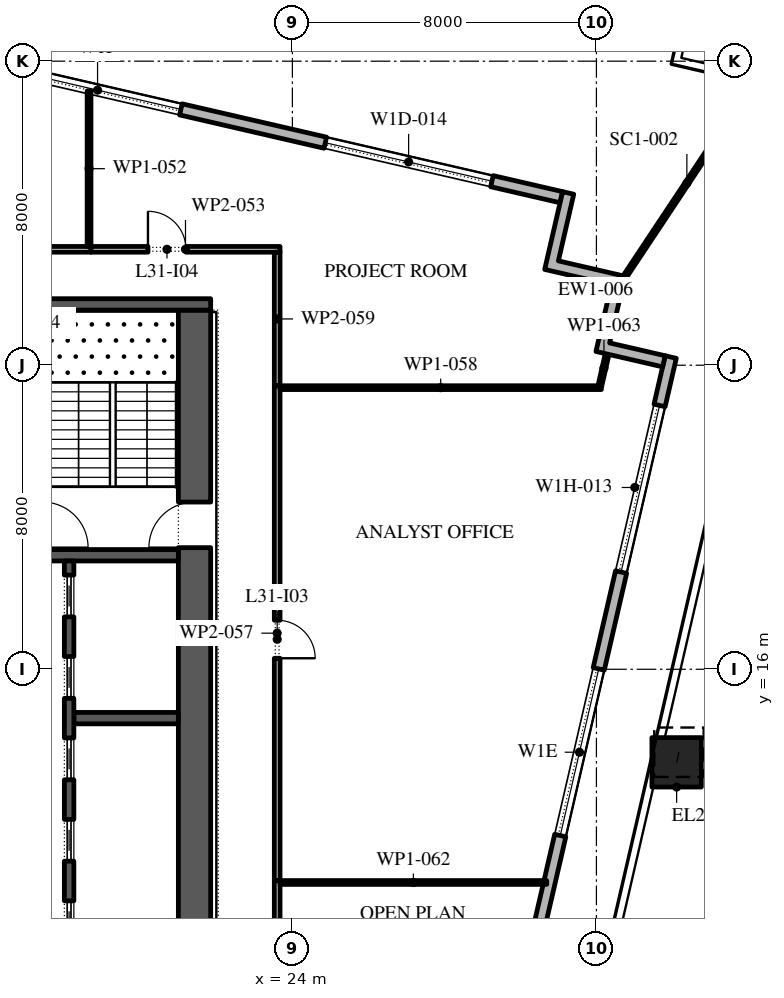
"""IFC4 building model, lengths in metres.
Left out: names, types, materials, properties, quantities, classifications, styles, units other than length and angle.
Written with IfcOpenShell. Run it as: python <this file> out.ifc"""

import sys

from ifc_helpers import new_model, si_unit, direction, frame, frame_2d, origin, origin_2d, place, context, subcontext, project, spatial, polyline, rectangle, outline, extrude, element, fill, save


model = new_model("IFC4")
c1 = context("Model", 3, precision=1e-05, world=origin(), true_north=direction((0.0, 1.0)))
c2 = subcontext(c1, "Body", "Model", "MODEL_VIEW")
j1 = project(units=[si_unit("LENGTHUNIT", "METRE"), si_unit("PLANEANGLEUNIT", "RADIAN")], contexts=[c1])
p1 = place(None, origin())
s1 = spatial("IfcSite", under=j1, at=p1, CompositionType="ELEMENT")
p2 = place(p1, origin())
s2 = spatial("IfcBuilding", under=s1, at=p2, CompositionType="ELEMENT")
p3 = place(p2, frame((0.0, 0.0, 143.4)))
s3 = spatial("IfcBuildingStorey", under=s2, at=p3, CompositionType="ELEMENT", Elevation=143.4)
p4 = place(p3, frame((34.111, 13.552, 0.0), z_axis=(0.014558999143, 0.063108330945, 0.997900483069), x_axis=(-0.97440628778, 0.224794097641, 0.0)))
e1 = element("IfcColumn", 1, at=p4, inside=s3, PredefinedType="COLUMN", context=c2, shape_type="SweptSolid", body=[
    extrude(rectangle(XDim=1.3, YDim=1.3, at=origin_2d()), origin(), (0.0, 0.0, 1.0), 4.209),
])
p5 = place(p3, frame((22.82, -24.016, 0.0), z_axis=(0.0, 0.0, 1.0), x_axis=(0.224953880882, 0.974369412223, 0.0)))
e2 = element("IfcWall", 2, at=p5, inside=s3, PredefinedType="STANDARD", context=c2, shape_type="SweptSolid", body=[
    extrude(rectangle(XDim=49.5, YDim=0.3, at=frame_2d((24.75, 0.0))), origin(), (0.0, 0.0, 1.0), 4.0),
])
p6 = place(p5, frame((1.157, 0.0, 0.45)))
e3 = element("IfcOpeningElement", 3, at=p6, cuts=e2, PredefinedType="OPENING", context=c2, shape_type="SweptSolid", body=[
    extrude(rectangle(XDim=4.5, YDim=3.05, at=frame_2d((2.25, 1.525))), frame((0.0, 0.16, 0.0), z_axis=(0.0, -1.0, 0.0), x_axis=(1.0, 0.0, 0.0)), (0.0, 0.0, 1.0), 0.32),
])
p7 = place(p5, frame((8.121, 0.0, 0.45)))
e4 = element("IfcOpeningElement", 4, at=p7, cuts=e2, PredefinedType="OPENING", context=c2, shape_type="SweptSolid", body=[
    extrude(rectangle(XDim=4.5, YDim=3.05, at=frame_2d((2.25, 1.525))), frame((0.0, 0.16, 0.0), z_axis=(0.0, -1.0, 0.0), x_axis=(1.0, 0.0, 0.0)), (0.0, 0.0, 1.0), 0.32),
])
p8 = place(p5, frame((15.236, 0.0, 0.45)))
e5 = element("IfcOpeningElement", 5, at=p8, cuts=e2, PredefinedType="OPENING", context=c2, shape_type="SweptSolid", body=[
    extrude(rectangle(XDim=4.5, YDim=3.05, at=frame_2d((2.25, 1.525))), frame((0.0, 0.16, 0.0), z_axis=(0.0, -1.0, 0.0), x_axis=(1.0, 0.0, 0.0)), (0.0, 0.0, 1.0), 0.32),
])
p9 = place(p5, frame((23.4, 0.0, 0.0)))
e6 = element("IfcOpeningElement", 6, at=p9, cuts=e2, PredefinedType="OPENING", context=c2, shape_type="SweptSolid", body=[
    extrude(rectangle(XDim=2.4, YDim=3.5, at=frame_2d((1.2, 1.75))), frame((0.0, 0.16, 0.0), z_axis=(0.0, -1.0, 0.0), x_axis=(1.0, 0.0, 0.0)), (0.0, 0.0, 1.0), 0.32),
])
p10 = place(p5, frame((29.464, 0.0, 0.45)))
e7 = element("IfcOpeningElement", 7, at=p10, cuts=e2, PredefinedType="OPENING", context=c2, shape_type="SweptSolid", body=[
    extrude(rectangle(XDim=4.5, YDim=2.875, at=frame_2d((2.25, 1.438))), frame((0.0, 0.16, 0.0), z_axis=(0.0, -1.0, 0.0), x_axis=(1.0, 0.0, 0.0)), (0.0, 0.0, 1.0), 0.32),
])
p11 = place(p5, frame((36.579, 0.0, 0.45)))
e8 = element("IfcOpeningElement", 8, at=p11, cuts=e2, PredefinedType="OPENING", context=c2, shape_type="SweptSolid", body=[
    extrude(rectangle(XDim=4.5, YDim=2.825, at=frame_2d((2.25, 1.413))), frame((0.0, 0.16, 0.0), z_axis=(0.0, -1.0, 0.0), x_axis=(1.0, 0.0, 0.0)), (0.0, 0.0, 1.0), 0.32),
])
p12 = place(p5, frame((43.693, 0.0, 0.45)))
e9 = element("IfcOpeningElement", 9, at=p12, cuts=e2, PredefinedType="OPENING", context=c2, shape_type="SweptSolid", body=[
    extrude(rectangle(XDim=4.5, YDim=2.75, at=frame_2d((2.25, 1.375))), frame((0.0, 0.16, 0.0), z_axis=(0.0, -1.0, 0.0), x_axis=(1.0, 0.0, 0.0)), (0.0, 0.0, 1.0), 0.32),
])
p13 = place(p3, frame((31.078, 28.421, 0.0), z_axis=(0.0, 0.0, 1.0), x_axis=(-0.974370456532, 0.224949357493, 0.0)))
e10 = element("IfcWall", 10, at=p13, inside=s3, PredefinedType="STANDARD", context=c2, shape_type="SweptSolid", body=[
    extrude(rectangle(XDim=51.0, YDim=0.3, at=frame_2d((25.5, 0.0))), origin(), (0.0, 0.0, 1.0), 4.0),
])
p14 = place(p13, frame((1.875, 0.0, 0.45)))
e11 = element("IfcOpeningElement", 11, at=p14, cuts=e10, PredefinedType="OPENING", context=c2, shape_type="SweptSolid", body=[
    extrude(rectangle(XDim=4.5, YDim=2.875, at=frame_2d((2.25, 1.438))), frame((0.0, 0.16, 0.0), z_axis=(0.0, -1.0, 0.0), x_axis=(1.0, 0.0, 0.0)), (0.0, 0.0, 1.0), 0.32),
])
p15 = place(p13, frame((10.275, 0.0, 0.45)))
e12 = element("IfcOpeningElement", 12, at=p15, cuts=e10, PredefinedType="OPENING", context=c2, shape_type="SweptSolid", body=[
    extrude(rectangle(XDim=4.5, YDim=2.8, at=frame_2d((2.25, 1.4))), frame((0.0, 0.16, 0.0), z_axis=(0.0, -1.0, 0.0), x_axis=(1.0, 0.0, 0.0)), (0.0, 0.0, 1.0), 0.32),
])
p16 = place(p13, frame((18.825, 0.0, 0.45)))
e13 = element("IfcOpeningElement", 13, at=p16, cuts=e10, PredefinedType="OPENING", context=c2, shape_type="SweptSolid", body=[
    extrude(rectangle(XDim=4.5, YDim=2.75, at=frame_2d((2.25, 1.375))), frame((0.0, 0.16, 0.0), z_axis=(0.0, -1.0, 0.0), x_axis=(1.0, 0.0, 0.0)), (0.0, 0.0, 1.0), 0.32),
])
p17 = place(p13, frame((28.425, 0.0, 0.0)))
e14 = element("IfcOpeningElement", 14, at=p17, cuts=e10, PredefinedType="OPENING", context=c2, shape_type="SweptSolid", body=[
    extrude(rectangle(XDim=2.4, YDim=3.025, at=frame_2d((1.2, 1.512))), frame((0.0, 0.16, 0.0), z_axis=(0.0, -1.0, 0.0), x_axis=(1.0, 0.0, 0.0)), (0.0, 0.0, 1.0), 0.32),
])
p18 = place(p13, frame((35.925, 0.0, 0.45)))
e15 = element("IfcOpeningElement", 15, at=p18, cuts=e10, PredefinedType="OPENING", context=c2, shape_type="SweptSolid", body=[
    extrude(rectangle(XDim=4.5, YDim=2.525, at=frame_2d((2.25, 1.262))), frame((0.0, 0.16, 0.0), z_axis=(0.0, -1.0, 0.0), x_axis=(1.0, 0.0, 0.0)), (0.0, 0.0, 1.0), 0.32),
])
p19 = place(p13, frame((44.475, 0.0, 0.45)))
e16 = element("IfcOpeningElement", 16, at=p19, cuts=e10, PredefinedType="OPENING", context=c2, shape_type="SweptSolid", body=[
    extrude(rectangle(XDim=4.5, YDim=2.45, at=frame_2d((2.25, 1.225))), frame((0.0, 0.16, 0.0), z_axis=(0.0, -1.0, 0.0), x_axis=(1.0, 0.0, 0.0)), (0.0, 0.0, 1.0), 0.32),
])
p20 = place(p3, origin())
e17 = element("IfcWall", 17, at=p20, inside=s3, PredefinedType="STANDARD", context=c2, shape_type="SweptSolid", body=[
    extrude(outline(polyline([(32.393, 26.116), (30.639, 26.521), (31.111, 28.567), (31.404, 28.5), (30.999, 26.746), (32.753, 26.341), (32.348, 24.587), (33.809, 24.25), (33.742, 23.957), (31.988, 24.362), (32.393, 26.116)])), origin(), (0.0, 0.0, 1.0), 4.0),
])
p21 = place(p3, frame((32.753, 26.341, -0.05), z_axis=(0.0, 0.0, 1.0), x_axis=(0.553540040051, 0.832822564572, 0.0)))
e18 = element("IfcWall", 18, at=p21, inside=s3, PredefinedType="STANDARD", context=c2, shape_type="SweptSolid", body=[
    extrude(rectangle(XDim=5.879, YDim=0.1, at=frame_2d((2.939, 0.0))), origin(), (0.0, 0.0, 1.0), 4.05),
])
p22 = place(p3, frame((21.425, -2.45, 0.0), z_axis=(0.0, 0.0, 1.0), x_axis=(0.0, 1.0, 0.0)))
e19 = element("IfcWall", 19, at=p22, inside=s3, PredefinedType="SHEAR", context=c2, shape_type="SweptSolid", body=[
    extrude(rectangle(XDim=27.9, YDim=0.85, at=frame_2d((13.95, 0.0))), origin(), (0.0, 0.0, 1.0), 4.0),
])
p23 = place(p22, frame((5.05, 0.0, 0.0)))
e20 = element("IfcOpeningElement", 20, at=p23, cuts=e19, PredefinedType="OPENING", context=c2, shape_type="SweptSolid", body=[
    extrude(rectangle(XDim=1.2, YDim=2.1, at=frame_2d((0.6, 1.05))), frame((0.0, 0.435, 0.0), z_axis=(0.0, -1.0, 0.0), x_axis=(1.0, 0.0, 0.0)), (0.0, 0.0, 1.0), 0.87),
])
p24 = place(p22, frame((21.65, 0.0, 0.0)))
e21 = element("IfcOpeningElement", 21, at=p24, cuts=e19, PredefinedType="OPENING", context=c2, shape_type="SweptSolid", body=[
    extrude(rectangle(XDim=1.2, YDim=2.1, at=frame_2d((0.6, 1.05))), frame((0.0, 0.435, 0.0), z_axis=(0.0, -1.0, 0.0), x_axis=(1.0, 0.0, 0.0)), (0.0, 0.0, 1.0), 0.87),
])
p25 = place(p3, frame((10.15, 25.6, 0.0), z_axis=(0.0, 0.0, 1.0), x_axis=(1.0, 0.0, 0.0)))
e22 = element("IfcWall", 22, at=p25, inside=s3, PredefinedType="SHEAR", context=c2, shape_type="SweptSolid", body=[
    extrude(rectangle(XDim=11.7, YDim=0.3, at=frame_2d((5.85, 0.0))), origin(), (0.0, 0.0, 1.0), 4.0),
])
p26 = place(p3, frame((17.3, 19.0, 0.0), z_axis=(0.0, 0.0, 1.0), x_axis=(1.0, 0.0, 0.0)))
e23 = element("IfcWall", 23, at=p26, inside=s3, PredefinedType="SHEAR", context=c2, shape_type="SweptSolid", body=[
    extrude(rectangle(XDim=3.7, YDim=0.3, at=frame_2d((1.85, 0.0))), origin(), (0.0, 0.0, 1.0), 4.0),
])
p27 = place(p3, frame((18.25, 14.714, 0.0), z_axis=(0.0, 0.0, 1.0), x_axis=(1.0, 0.0, 0.0)))
e24 = element("IfcWall", 24, at=p27, inside=s3, PredefinedType="SHEAR", context=c2, shape_type="SweptSolid", body=[
    extrude(rectangle(XDim=2.75, YDim=0.3, at=frame_2d((1.375, 0.0))), origin(), (0.0, 0.0, 1.0), 4.0),
])
p28 = place(p3, frame((18.125, 4.15, 0.0), z_axis=(0.0, 0.0, 1.0), x_axis=(0.0, 1.0, 0.0)))
e25 = element("IfcWall", 25, at=p28, inside=s3, PredefinedType="SHEAR", context=c2, shape_type="SweptSolid", body=[
    extrude(rectangle(XDim=14.7, YDim=0.25, at=frame_2d((7.35, 0.0))), origin(), (0.0, 0.0, 1.0), 4.0),
])
p29 = place(p28, frame((0.371, 0.0, 0.0)))
e26 = element("IfcOpeningElement", 26, at=p29, cuts=e25, PredefinedType="OPENING", context=c2, shape_type="SweptSolid", body=[
    extrude(rectangle(XDim=1.1, YDim=2.1, at=frame_2d((0.55, 1.05))), frame((0.0, 0.135, 0.0), z_axis=(0.0, -1.0, 0.0), x_axis=(1.0, 0.0, 0.0)), (0.0, 0.0, 1.0), 0.27),
])
p30 = place(p28, frame((2.514, 0.0, 0.0)))
e27 = element("IfcOpeningElement", 27, at=p30, cuts=e25, PredefinedType="OPENING", context=c2, shape_type="SweptSolid", body=[
    extrude(rectangle(XDim=1.1, YDim=2.1, at=frame_2d((0.55, 1.05))), frame((0.0, 0.135, 0.0), z_axis=(0.0, -1.0, 0.0), x_axis=(1.0, 0.0, 0.0)), (0.0, 0.0, 1.0), 0.27),
])
p31 = place(p28, frame((4.657, 0.0, 0.0)))
e28 = element("IfcOpeningElement", 28, at=p31, cuts=e25, PredefinedType="OPENING", context=c2, shape_type="SweptSolid", body=[
    extrude(rectangle(XDim=1.1, YDim=2.1, at=frame_2d((0.55, 1.05))), frame((0.0, 0.135, 0.0), z_axis=(0.0, -1.0, 0.0), x_axis=(1.0, 0.0, 0.0)), (0.0, 0.0, 1.0), 0.27),
])
p32 = place(p28, frame((6.8, 0.0, 0.0)))
e29 = element("IfcOpeningElement", 29, at=p32, cuts=e25, PredefinedType="OPENING", context=c2, shape_type="SweptSolid", body=[
    extrude(rectangle(XDim=1.1, YDim=2.1, at=frame_2d((0.55, 1.05))), frame((0.0, 0.135, 0.0), z_axis=(0.0, -1.0, 0.0), x_axis=(1.0, 0.0, 0.0)), (0.0, 0.0, 1.0), 0.27),
])
p33 = place(p28, frame((8.943, 0.0, 0.0)))
e30 = element("IfcOpeningElement", 30, at=p33, cuts=e25, PredefinedType="OPENING", context=c2, shape_type="SweptSolid", body=[
    extrude(rectangle(XDim=1.1, YDim=2.1, at=frame_2d((0.55, 1.05))), frame((0.0, 0.135, 0.0), z_axis=(0.0, -1.0, 0.0), x_axis=(1.0, 0.0, 0.0)), (0.0, 0.0, 1.0), 0.27),
])
p34 = place(p28, frame((11.086, 0.0, 0.0)))
e31 = element("IfcOpeningElement", 31, at=p34, cuts=e25, PredefinedType="OPENING", context=c2, shape_type="SweptSolid", body=[
    extrude(rectangle(XDim=1.1, YDim=2.1, at=frame_2d((0.55, 1.05))), frame((0.0, 0.135, 0.0), z_axis=(0.0, -1.0, 0.0), x_axis=(1.0, 0.0, 0.0)), (0.0, 0.0, 1.0), 0.27),
])
p35 = place(p28, frame((13.229, 0.0, 0.0)))
e32 = element("IfcOpeningElement", 32, at=p35, cuts=e25, PredefinedType="OPENING", context=c2, shape_type="SweptSolid", body=[
    extrude(rectangle(XDim=1.1, YDim=2.1, at=frame_2d((0.55, 1.05))), frame((0.0, 0.135, 0.0), z_axis=(0.0, -1.0, 0.0), x_axis=(1.0, 0.0, 0.0)), (0.0, 0.0, 1.0), 0.27),
])
p36 = place(p3, frame((8.4, 27.05, 0.0), z_axis=(0.0, 0.0, 1.0), x_axis=(1.0, 0.0, 0.0)))
e33 = element("IfcWall", 33, at=p36, inside=s3, PredefinedType="PARTITIONING", context=c2, shape_type="SweptSolid", body=[
    extrude(rectangle(XDim=10.3, YDim=0.15, at=frame_2d((5.15, 0.0))), origin(), (0.0, 0.0, 1.0), 4.0),
])
p37 = place(p36, frame((6.6, 0.0, 0.0)))
e34 = element("IfcOpeningElement", 34, at=p37, cuts=e33, PredefinedType="OPENING", context=c2, shape_type="SweptSolid", body=[
    extrude(rectangle(XDim=1.0, YDim=2.1, at=frame_2d((0.5, 1.05))), frame((0.0, 0.085, 0.0), z_axis=(0.0, -1.0, 0.0), x_axis=(1.0, 0.0, 0.0)), (0.0, 0.0, 1.0), 0.17),
])
p38 = place(p3, frame((18.65, 27.125, 0.0), z_axis=(0.0, 0.0, 1.0), x_axis=(0.0, 1.0, 0.0)))
e35 = element("IfcWall", 35, at=p38, inside=s3, PredefinedType="PARTITIONING", context=c2, shape_type="SweptSolid", body=[
    extrude(rectangle(XDim=4.094, YDim=0.1, at=frame_2d((2.047, 0.0))), origin(), (0.0, 0.0, 1.0), 4.0),
])
p39 = place(p3, frame((18.7, 27.05, 0.0), z_axis=(0.0, 0.0, 1.0), x_axis=(1.0, 0.0, 0.0)))
e36 = element("IfcWall", 36, at=p39, inside=s3, PredefinedType="PARTITIONING", context=c2, shape_type="SweptSolid", body=[
    extrude(rectangle(XDim=4.975, YDim=0.15, at=frame_2d((2.488, 0.0))), origin(), (0.0, 0.0, 1.0), 4.0),
])
p40 = place(p39, frame((1.5, 0.0, 0.0)))
e37 = element("IfcOpeningElement", 37, at=p40, cuts=e36, PredefinedType="OPENING", context=c2, shape_type="SweptSolid", body=[
    extrude(rectangle(XDim=1.0, YDim=2.1, at=frame_2d((0.5, 1.05))), frame((0.0, 0.085, 0.0), z_axis=(0.0, -1.0, 0.0), x_axis=(1.0, 0.0, 0.0)), (0.0, 0.0, 1.0), 0.17),
])
p41 = place(p3, frame((23.6, 10.44, 0.0), z_axis=(0.0, 0.0, 1.0), x_axis=(0.0, -1.0, 0.0)))
e38 = element("IfcWall", 38, at=p41, inside=s3, PredefinedType="PARTITIONING", context=c2, shape_type="SweptSolid", body=[
    extrude(rectangle(XDim=14.81, YDim=0.15, at=frame_2d((7.405, 0.0))), origin(), (0.0, 0.0, 1.0), 4.0),
])
p42 = place(p41, frame((6.86, 0.0, 0.0)))
e39 = element("IfcOpeningElement", 39, at=p42, cuts=e38, PredefinedType="OPENING", context=c2, shape_type="SweptSolid", body=[
    extrude(rectangle(XDim=1.0, YDim=2.1, at=frame_2d((0.5, 1.05))), frame((0.0, 0.085, 0.0), z_axis=(0.0, -1.0, 0.0), x_axis=(1.0, 0.0, 0.0)), (0.0, 0.0, 1.0), 0.17),
])
p43 = place(p3, frame((23.6, 23.46, 0.0), z_axis=(0.0, 0.0, 1.0), x_axis=(0.0, -1.0, 0.0)))
e40 = element("IfcWall", 40, at=p43, inside=s3, PredefinedType="PARTITIONING", context=c2, shape_type="SweptSolid", body=[
    extrude(rectangle(XDim=13.02, YDim=0.15, at=frame_2d((6.51, 0.0))), origin(), (0.0, 0.0, 1.0), 4.0),
])
p44 = place(p43, frame((6.17, 0.0, 0.0)))
e41 = element("IfcOpeningElement", 41, at=p44, cuts=e40, PredefinedType="OPENING", context=c2, shape_type="SweptSolid", body=[
    extrude(rectangle(XDim=1.0, YDim=2.1, at=frame_2d((0.5, 1.05))), frame((0.0, 0.085, 0.0), z_axis=(0.0, -1.0, 0.0), x_axis=(1.0, 0.0, 0.0)), (0.0, 0.0, 1.0), 0.17),
])
p45 = place(p3, frame((23.675, 23.41, 0.0), z_axis=(0.0, 0.0, 1.0), x_axis=(1.0, 0.0, 0.0)))
e42 = element("IfcWall", 42, at=p45, inside=s3, PredefinedType="PARTITIONING", context=c2, shape_type="SweptSolid", body=[
    extrude(rectangle(XDim=8.455, YDim=0.1, at=frame_2d((4.228, 0.0))), origin(), (0.0, 0.0, 1.0), 4.0),
])
p46 = place(p3, frame((23.6, 26.975, 0.0), z_axis=(0.0, 0.0, 1.0), x_axis=(0.0, -1.0, 0.0)))
e43 = element("IfcWall", 43, at=p46, inside=s3, PredefinedType="PARTITIONING", context=c2, shape_type="SweptSolid", body=[
    extrude(rectangle(XDim=3.515, YDim=0.15, at=frame_2d((1.758, 0.0))), origin(), (0.0, 0.0, 1.0), 4.0),
])
p47 = place(p3, frame((30.692, 10.39, 0.0), z_axis=(0.0, 0.0, 1.0), x_axis=(-1.0, 0.0, 0.0)))
e44 = element("IfcWall", 44, at=p47, inside=s3, PredefinedType="PARTITIONING", context=c2, shape_type="SweptSolid", body=[
    extrude(rectangle(XDim=7.017, YDim=0.1, at=frame_2d((3.508, 0.0))), origin(), (0.0, 0.0, 1.0), 4.0),
])
p48 = place(p3, frame((32.091, 23.459, 0.0), z_axis=(0.0, 0.0, 1.0), x_axis=(0.223406444343, 0.97472537703, 0.0)))
e45 = element("IfcWall", 45, at=p48, inside=s3, PredefinedType="PARTITIONING", context=c2, shape_type="SweptSolid", body=[
    extrude(rectangle(XDim=0.957, YDim=0.1, at=frame_2d((0.479, 0.0))), origin(), (0.0, 0.0, 1.0), 4.0),
])
p49 = place(p11, origin())
e46 = element("IfcWindow", 46, at=p49, inside=s3, PartitioningType="DOUBLE_PANEL_VERTICAL", PredefinedType="WINDOW", context=c2, shape_type="SweptSolid", body=[
    extrude(rectangle(XDim=4.5, YDim=2.825, at=frame_2d((2.25, 1.413))), frame((0.0, 0.03, 0.0), z_axis=(0.0, -1.0, 0.0), x_axis=(1.0, 0.0, 0.0)), (0.0, 0.0, 1.0), 0.06),
])
fill(e8, e46)
p50 = place(p12, origin())
e47 = element("IfcWindow", 47, at=p50, inside=s3, PartitioningType="DOUBLE_PANEL_VERTICAL", PredefinedType="WINDOW", context=c2, shape_type="SweptSolid", body=[
    extrude(rectangle(XDim=4.5, YDim=2.75, at=frame_2d((2.25, 1.375))), frame((0.0, 0.03, 0.0), z_axis=(0.0, -1.0, 0.0), x_axis=(1.0, 0.0, 0.0)), (0.0, 0.0, 1.0), 0.06),
])
fill(e9, e47)
p51 = place(p14, origin())
e48 = element("IfcWindow", 48, at=p51, inside=s3, PartitioningType="DOUBLE_PANEL_VERTICAL", PredefinedType="WINDOW", context=c2, shape_type="SweptSolid", body=[
    extrude(rectangle(XDim=4.5, YDim=2.875, at=frame_2d((2.25, 1.438))), frame((0.0, 0.03, 0.0), z_axis=(0.0, -1.0, 0.0), x_axis=(1.0, 0.0, 0.0)), (0.0, 0.0, 1.0), 0.06),
])
fill(e11, e48)
p52 = place(p15, origin())
e49 = element("IfcWindow", 49, at=p52, inside=s3, PartitioningType="DOUBLE_PANEL_VERTICAL", PredefinedType="WINDOW", context=c2, shape_type="SweptSolid", body=[
    extrude(rectangle(XDim=4.5, YDim=2.8, at=frame_2d((2.25, 1.4))), frame((0.0, 0.03, 0.0), z_axis=(0.0, -1.0, 0.0), x_axis=(1.0, 0.0, 0.0)), (0.0, 0.0, 1.0), 0.06),
])
fill(e12, e49)
p53 = place(p31, origin())
e50 = element("IfcDoor", 50, at=p53, inside=s3, OperationType="SLIDING_TO_LEFT", PredefinedType="DOOR", context=c2, shape_type="SweptSolid", body=[
    extrude(rectangle(XDim=1.1, YDim=2.1, at=frame_2d((0.55, 1.05))), frame((0.0, 0.025, 0.0), z_axis=(0.0, -1.0, 0.0), x_axis=(1.0, 0.0, 0.0)), (0.0, 0.0, 1.0), 0.05),
])
fill(e28, e50)
p54 = place(p32, origin())
e51 = element("IfcDoor", 51, at=p54, inside=s3, OperationType="SLIDING_TO_LEFT", PredefinedType="DOOR", context=c2, shape_type="SweptSolid", body=[
    extrude(rectangle(XDim=1.1, YDim=2.1, at=frame_2d((0.55, 1.05))), frame((0.0, 0.025, 0.0), z_axis=(0.0, -1.0, 0.0), x_axis=(1.0, 0.0, 0.0)), (0.0, 0.0, 1.0), 0.05),
])
fill(e29, e51)
p55 = place(p33, origin())
e52 = element("IfcDoor", 52, at=p55, inside=s3, OperationType="SLIDING_TO_LEFT", PredefinedType="DOOR", context=c2, shape_type="SweptSolid", body=[
    extrude(rectangle(XDim=1.1, YDim=2.1, at=frame_2d((0.55, 1.05))), frame((0.0, 0.025, 0.0), z_axis=(0.0, -1.0, 0.0), x_axis=(1.0, 0.0, 0.0)), (0.0, 0.0, 1.0), 0.05),
])
fill(e30, e52)
p56 = place(p34, origin())
e53 = element("IfcDoor", 53, at=p56, inside=s3, OperationType="SLIDING_TO_LEFT", PredefinedType="DOOR", context=c2, shape_type="SweptSolid", body=[
    extrude(rectangle(XDim=1.1, YDim=2.1, at=frame_2d((0.55, 1.05))), frame((0.0, 0.025, 0.0), z_axis=(0.0, -1.0, 0.0), x_axis=(1.0, 0.0, 0.0)), (0.0, 0.0, 1.0), 0.05),
])
fill(e31, e53)
p57 = place(p35, origin())
e54 = element("IfcDoor", 54, at=p57, inside=s3, OperationType="SLIDING_TO_LEFT", PredefinedType="DOOR", context=c2, shape_type="SweptSolid", body=[
    extrude(rectangle(XDim=1.1, YDim=2.1, at=frame_2d((0.55, 1.05))), frame((0.0, 0.025, 0.0), z_axis=(0.0, -1.0, 0.0), x_axis=(1.0, 0.0, 0.0)), (0.0, 0.0, 1.0), 0.05),
])
fill(e32, e54)
p58 = place(p24, origin())
e55 = element("IfcDoor", 55, at=p58, inside=s3, OperationType="SINGLE_SWING_RIGHT", PredefinedType="DOOR", context=c2, shape_type="SweptSolid", body=[
    extrude(rectangle(XDim=1.2, YDim=2.1, at=frame_2d((0.6, 1.05))), frame((0.0, 0.025, 0.0), z_axis=(0.0, -1.0, 0.0), x_axis=(1.0, 0.0, 0.0)), (0.0, 0.0, 1.0), 0.05),
])
fill(e21, e55)
p59 = place(p44, origin())
e56 = element("IfcDoor", 56, at=p59, inside=s3, OperationType="SINGLE_SWING_LEFT", PredefinedType="DOOR", context=c2, shape_type="SweptSolid", body=[
    extrude(rectangle(XDim=1.0, YDim=2.1, at=frame_2d((0.5, 1.05))), frame((0.0, 0.025, 0.0), z_axis=(0.0, -1.0, 0.0), x_axis=(1.0, 0.0, 0.0)), (0.0, 0.0, 1.0), 0.05),
])
fill(e41, e56)
p60 = place(p40, origin())
e57 = element("IfcDoor", 57, at=p60, inside=s3, OperationType="SINGLE_SWING_RIGHT", PredefinedType="DOOR", context=c2, shape_type="SweptSolid", body=[
    extrude(rectangle(XDim=1.0, YDim=2.1, at=frame_2d((0.5, 1.05))), frame((0.0, 0.025, 0.0), z_axis=(0.0, -1.0, 0.0), x_axis=(1.0, 0.0, 0.0)), (0.0, 0.0, 1.0), 0.05),
])
fill(e37, e57)
save(model, sys.argv[1])
